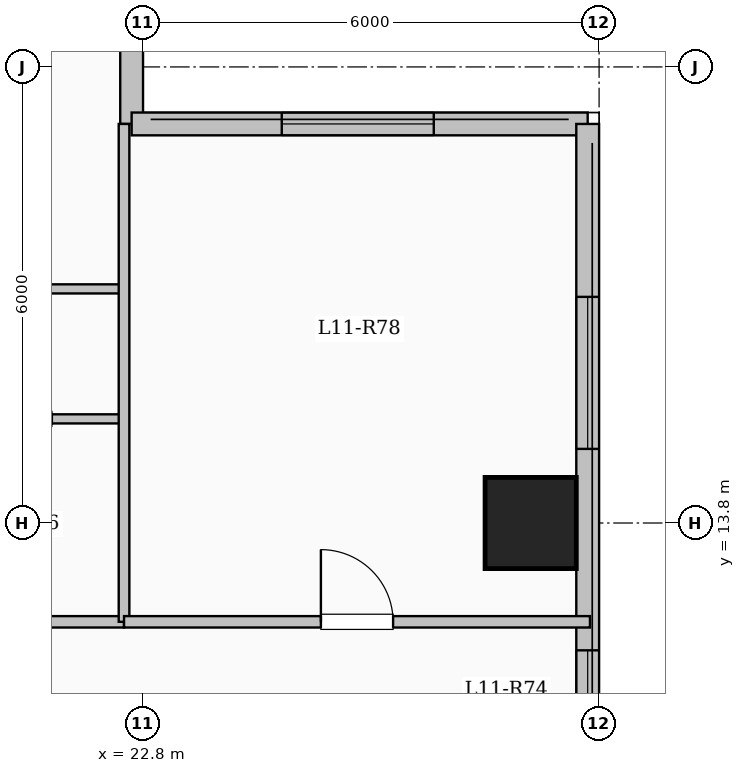
"""IFC4 building model, lengths in metres.
Left out: names, types, materials, properties, quantities, classifications, styles, units other than length and angle.
Written with IfcOpenShell. Run it as: python <this file> out.ifc"""

import sys

from ifc_helpers import new_model, si_unit, direction, frame, frame_2d, origin, origin_2d, place, context, subcontext, project, spatial, rectangle, extrude, element, fill, save


model = new_model("IFC4")
c1 = context("Model", 3, precision=1e-05, world=origin(), true_north=direction((0.0, 1.0)))
c2 = subcontext(c1, "Body", "Model", "MODEL_VIEW")
j1 = project(units=[si_unit("LENGTHUNIT", "METRE"), si_unit("PLANEANGLEUNIT", "RADIAN")], contexts=[c1])
p1 = place(None, origin())
s1 = spatial("IfcSite", under=j1, at=p1, CompositionType="ELEMENT")
p2 = place(p1, origin())
s2 = spatial("IfcBuilding", under=s1, at=p2, CompositionType="ELEMENT")
p3 = place(p2, frame((0.0, 0.0, 44.1)))
s3 = spatial("IfcBuildingStorey", under=s2, at=p3, CompositionType="ELEMENT", Elevation=44.1)
p4 = place(p3, frame((27.9, 13.8, 0.0), z_axis=(0.0, 0.0, 1.0), x_axis=(1.0, 0.0, 0.0)))
e1 = element("IfcColumn", 1, at=p4, inside=s3, PredefinedType="COLUMN", context=c2, shape_type="SweptSolid", body=[
    extrude(rectangle(XDim=1.2, YDim=1.2, at=origin_2d()), origin(), (0.0, 0.0, 1.0), 3.35),
])
p5 = place(p3, frame((22.65, 23.55, 0.0), z_axis=(0.0, 0.0, 1.0), x_axis=(0.0, -1.0, 0.0)))
e2 = element("IfcWall", 2, at=p5, inside=s3, PredefinedType="SOLIDWALL", context=c2, shape_type="SweptSolid", body=[
    extrude(rectangle(XDim=4.5, YDim=0.3, at=frame_2d((2.25, 0.0))), origin(), (0.0, 0.0, 1.0), 3.1),
])
p6 = place(p5, frame((1.367, 0.0, 0.9)))
e3 = element("IfcOpeningElement", 3, at=p6, cuts=e2, PredefinedType="OPENING", context=c2, shape_type="SweptSolid", body=[
    extrude(rectangle(XDim=1.8, YDim=1.65, at=frame_2d((0.9, 0.825))), frame((0.0, 0.16, 0.0), z_axis=(0.0, -1.0, 0.0), x_axis=(1.0, 0.0, 0.0)), (0.0, 0.0, 1.0), 0.32),
])
p7 = place(p3, frame((22.65, 19.05, 0.0), z_axis=(0.0, 0.0, 1.0), x_axis=(1.0, 0.0, 0.0)))
e4 = element("IfcWall", 4, at=p7, inside=s3, PredefinedType="SOLIDWALL", context=c2, shape_type="SweptSolid", body=[
    extrude(rectangle(XDim=6.0, YDim=0.3, at=frame_2d((3.0, 0.0))), origin(), (0.0, 0.0, 1.0), 3.1),
])
p8 = place(p7, frame((1.975, 0.0, 0.9)))
e5 = element("IfcOpeningElement", 5, at=p8, cuts=e4, PredefinedType="OPENING", context=c2, shape_type="SweptSolid", body=[
    extrude(rectangle(XDim=2.0, YDim=1.7, at=frame_2d((1.0, 0.85))), frame((0.0, 0.16, 0.0), z_axis=(0.0, -1.0, 0.0), x_axis=(1.0, 0.0, 0.0)), (0.0, 0.0, 1.0), 0.32),
])
p9 = place(p3, frame((28.65, 19.05, 0.0), z_axis=(0.0, 0.0, 1.0), x_axis=(0.0, -1.0, 0.0)))
e6 = element("IfcWall", 6, at=p9, inside=s3, PredefinedType="SOLIDWALL", context=c2, shape_type="SweptSolid", body=[
    extrude(rectangle(XDim=38.1, YDim=0.3, at=frame_2d((19.05, 0.0))), origin(), (0.0, 0.0, 1.0), 3.1),
])
p10 = place(p9, frame((2.275, 0.0, 0.9)))
e7 = element("IfcOpeningElement", 7, at=p10, cuts=e6, PredefinedType="OPENING", context=c2, shape_type="SweptSolid", body=[
    extrude(rectangle(XDim=2.0, YDim=1.7, at=frame_2d((1.0, 0.85))), frame((0.0, 0.16, 0.0), z_axis=(0.0, -1.0, 0.0), x_axis=(1.0, 0.0, 0.0)), (0.0, 0.0, 1.0), 0.32),
])
p11 = place(p9, frame((6.925, 0.0, 0.95)))
e8 = element("IfcOpeningElement", 8, at=p11, cuts=e6, PredefinedType="OPENING", context=c2, shape_type="SweptSolid", body=[
    extrude(rectangle(XDim=1.0, YDim=1.5, at=frame_2d((0.5, 0.75))), frame((0.0, 0.16, 0.0), z_axis=(0.0, -1.0, 0.0), x_axis=(1.0, 0.0, 0.0)), (0.0, 0.0, 1.0), 0.32),
])
p12 = place(p9, frame((10.175, 0.0, 0.9)))
e9 = element("IfcOpeningElement", 9, at=p12, cuts=e6, PredefinedType="OPENING", context=c2, shape_type="SweptSolid", body=[
    extrude(rectangle(XDim=2.0, YDim=1.7, at=frame_2d((1.0, 0.85))), frame((0.0, 0.16, 0.0), z_axis=(0.0, -1.0, 0.0), x_axis=(1.0, 0.0, 0.0)), (0.0, 0.0, 1.0), 0.32),
])
p13 = place(p9, frame((14.925, 0.0, 0.9)))
e10 = element("IfcOpeningElement", 10, at=p13, cuts=e6, PredefinedType="OPENING", context=c2, shape_type="SweptSolid", body=[
    extrude(rectangle(XDim=1.8, YDim=1.65, at=frame_2d((0.9, 0.825))), frame((0.0, 0.16, 0.0), z_axis=(0.0, -1.0, 0.0), x_axis=(1.0, 0.0, 0.0)), (0.0, 0.0, 1.0), 0.32),
])
p14 = place(p9, frame((20.75, 0.0, 0.9)))
e11 = element("IfcOpeningElement", 11, at=p14, cuts=e6, PredefinedType="OPENING", context=c2, shape_type="SweptSolid", body=[
    extrude(rectangle(XDim=2.4, YDim=1.8, at=frame_2d((1.2, 0.9))), frame((0.0, 0.16, 0.0), z_axis=(0.0, -1.0, 0.0), x_axis=(1.0, 0.0, 0.0)), (0.0, 0.0, 1.0), 0.32),
])
p15 = place(p9, frame((27.058, 0.0, 0.9)))
e12 = element("IfcOpeningElement", 12, at=p15, cuts=e6, PredefinedType="OPENING", context=c2, shape_type="SweptSolid", body=[
    extrude(rectangle(XDim=1.5, YDim=1.65, at=frame_2d((0.75, 0.825))), frame((0.0, 0.16, 0.0), z_axis=(0.0, -1.0, 0.0), x_axis=(1.0, 0.0, 0.0)), (0.0, 0.0, 1.0), 0.32),
])
p16 = place(p9, frame((32.55, 0.0, 0.9)))
e13 = element("IfcOpeningElement", 13, at=p16, cuts=e6, PredefinedType="OPENING", context=c2, shape_type="SweptSolid", body=[
    extrude(rectangle(XDim=2.4, YDim=1.8, at=frame_2d((1.2, 0.9))), frame((0.0, 0.16, 0.0), z_axis=(0.0, -1.0, 0.0), x_axis=(1.0, 0.0, 0.0)), (0.0, 0.0, 1.0), 0.32),
])
p17 = place(p3, frame((3.85, 12.5, 0.0), z_axis=(0.0, 0.0, 1.0), x_axis=(1.0, 0.0, 0.0)))
e14 = element("IfcWall", 14, at=p17, inside=s3, PredefinedType="PARTITIONING", context=c2, shape_type="SweptSolid", body=[
    extrude(rectangle(XDim=18.7, YDim=0.15, at=frame_2d((9.35, 0.0))), origin(), (0.0, 0.0, 1.0), 3.1),
])
p18 = place(p17, frame((1.6, 0.0, 0.0)))
e15 = element("IfcOpeningElement", 15, at=p18, cuts=e14, PredefinedType="OPENING", context=c2, shape_type="SweptSolid", body=[
    extrude(rectangle(XDim=0.96, YDim=2.15, at=frame_2d((0.48, 1.075))), frame((0.0, 0.085, 0.0), z_axis=(0.0, -1.0, 0.0), x_axis=(1.0, 0.0, 0.0)), (0.0, 0.0, 1.0), 0.17),
])
p19 = place(p17, frame((6.64, 0.0, 0.0)))
e16 = element("IfcOpeningElement", 16, at=p19, cuts=e14, PredefinedType="OPENING", context=c2, shape_type="SweptSolid", body=[
    extrude(rectangle(XDim=0.96, YDim=2.15, at=frame_2d((0.48, 1.075))), frame((0.0, 0.085, 0.0), z_axis=(0.0, -1.0, 0.0), x_axis=(1.0, 0.0, 0.0)), (0.0, 0.0, 1.0), 0.17),
])
p20 = place(p3, frame((19.772, 15.17, 0.0), z_axis=(0.0, 0.0, 1.0), x_axis=(1.0, 0.0, 0.0)))
e17 = element("IfcWall", 17, at=p20, inside=s3, PredefinedType="PARTITIONING", context=c2, shape_type="SweptSolid", body=[
    extrude(rectangle(XDim=2.778, YDim=0.12, at=frame_2d((1.389, 0.0))), origin(), (0.0, 0.0, 1.0), 3.1),
])
p21 = place(p20, frame((0.949, 0.0, 0.0)))
e18 = element("IfcOpeningElement", 18, at=p21, cuts=e17, PredefinedType="OPENING", context=c2, shape_type="SweptSolid", body=[
    extrude(rectangle(XDim=0.88, YDim=2.1, at=frame_2d((0.44, 1.05))), frame((0.0, 0.07, 0.0), z_axis=(0.0, -1.0, 0.0), x_axis=(1.0, 0.0, 0.0)), (0.0, 0.0, 1.0), 0.14),
])
p22 = place(p3, frame((16.11, 16.88, 0.0), z_axis=(0.0, 0.0, 1.0), x_axis=(1.0, 0.0, 0.0)))
e19 = element("IfcWall", 19, at=p22, inside=s3, PredefinedType="PARTITIONING", context=c2, shape_type="SweptSolid", body=[
    extrude(rectangle(XDim=6.5, YDim=0.12, at=frame_2d((3.25, 0.0))), origin(), (0.0, 0.0, 1.0), 3.1),
])
p23 = place(p22, frame((1.14, 0.0, 0.0)))
e20 = element("IfcOpeningElement", 20, at=p23, cuts=e19, PredefinedType="OPENING", context=c2, shape_type="SweptSolid", body=[
    extrude(rectangle(XDim=0.88, YDim=2.1, at=frame_2d((0.44, 1.05))), frame((0.0, 0.07, 0.0), z_axis=(0.0, -1.0, 0.0), x_axis=(1.0, 0.0, 0.0)), (0.0, 0.0, 1.0), 0.14),
])
p24 = place(p22, frame((4.3, 0.0, 0.0)))
e21 = element("IfcOpeningElement", 21, at=p24, cuts=e19, PredefinedType="OPENING", context=c2, shape_type="SweptSolid", body=[
    extrude(rectangle(XDim=0.88, YDim=2.1, at=frame_2d((0.44, 1.05))), frame((0.0, 0.07, 0.0), z_axis=(0.0, -1.0, 0.0), x_axis=(1.0, 0.0, 0.0)), (0.0, 0.0, 1.0), 0.14),
])
p25 = place(p3, frame((22.55, 12.5, 0.0), z_axis=(0.0, 0.0, 1.0), x_axis=(0.0, 1.0, 0.0)))
e22 = element("IfcWall", 22, at=p25, inside=s3, PredefinedType="PARTITIONING", context=c2, shape_type="SweptSolid", body=[
    extrude(rectangle(XDim=6.55, YDim=0.14, at=frame_2d((3.275, 0.0))), origin(), (0.0, 0.0, 1.0), 3.1),
])
p26 = place(p3, frame((22.55, 12.5, 0.0), z_axis=(0.0, 0.0, 1.0), x_axis=(1.0, 0.0, 0.0)))
e23 = element("IfcWall", 23, at=p26, inside=s3, PredefinedType="PARTITIONING", context=c2, shape_type="SweptSolid", body=[
    extrude(rectangle(XDim=6.13, YDim=0.15, at=frame_2d((3.065, 0.0))), origin(), (0.0, 0.0, 1.0), 3.1),
])
p27 = place(p26, frame((2.59, 0.0, 0.0)))
e24 = element("IfcOpeningElement", 24, at=p27, cuts=e23, PredefinedType="OPENING", context=c2, shape_type="SweptSolid", body=[
    extrude(rectangle(XDim=0.95, YDim=2.15, at=frame_2d((0.475, 1.075))), frame((0.0, 0.085, 0.0), z_axis=(0.0, -1.0, 0.0), x_axis=(1.0, 0.0, 0.0)), (0.0, 0.0, 1.0), 0.17),
])
p28 = place(p8, origin())
e25 = element("IfcWindow", 25, at=p28, inside=s3, PartitioningType="SINGLE_PANEL", PredefinedType="WINDOW", context=c2, shape_type="SweptSolid", body=[
    extrude(rectangle(XDim=2.0, YDim=1.7, at=frame_2d((1.0, 0.85))), frame((0.0, 0.03, 0.0), z_axis=(0.0, -1.0, 0.0), x_axis=(1.0, 0.0, 0.0)), (0.0, 0.0, 1.0), 0.06),
])
fill(e5, e25)
p29 = place(p10, origin())
e26 = element("IfcWindow", 26, at=p29, inside=s3, PartitioningType="SINGLE_PANEL", PredefinedType="WINDOW", context=c2, shape_type="SweptSolid", body=[
    extrude(rectangle(XDim=2.0, YDim=1.7, at=frame_2d((1.0, 0.85))), frame((0.0, 0.03, 0.0), z_axis=(0.0, -1.0, 0.0), x_axis=(1.0, 0.0, 0.0)), (0.0, 0.0, 1.0), 0.06),
])
fill(e7, e26)
p30 = place(p11, origin())
e27 = element("IfcWindow", 27, at=p30, inside=s3, PartitioningType="SINGLE_PANEL", PredefinedType="WINDOW", context=c2, shape_type="SweptSolid", body=[
    extrude(rectangle(XDim=1.0, YDim=1.5, at=frame_2d((0.5, 0.75))), frame((0.0, 0.03, 0.0), z_axis=(0.0, -1.0, 0.0), x_axis=(1.0, 0.0, 0.0)), (0.0, 0.0, 1.0), 0.06),
])
fill(e8, e27)
p31 = place(p27, origin())
e28 = element("IfcDoor", 28, at=p31, inside=s3, OperationType="SINGLE_SWING_LEFT", PredefinedType="DOOR", context=c2, shape_type="SweptSolid", body=[
    extrude(rectangle(XDim=0.95, YDim=2.15, at=frame_2d((0.475, 1.075))), frame((0.0, 0.025, 0.0), z_axis=(0.0, -1.0, 0.0), x_axis=(1.0, 0.0, 0.0)), (0.0, 0.0, 1.0), 0.05),
])
fill(e24, e28)
save(model, sys.argv[1])
